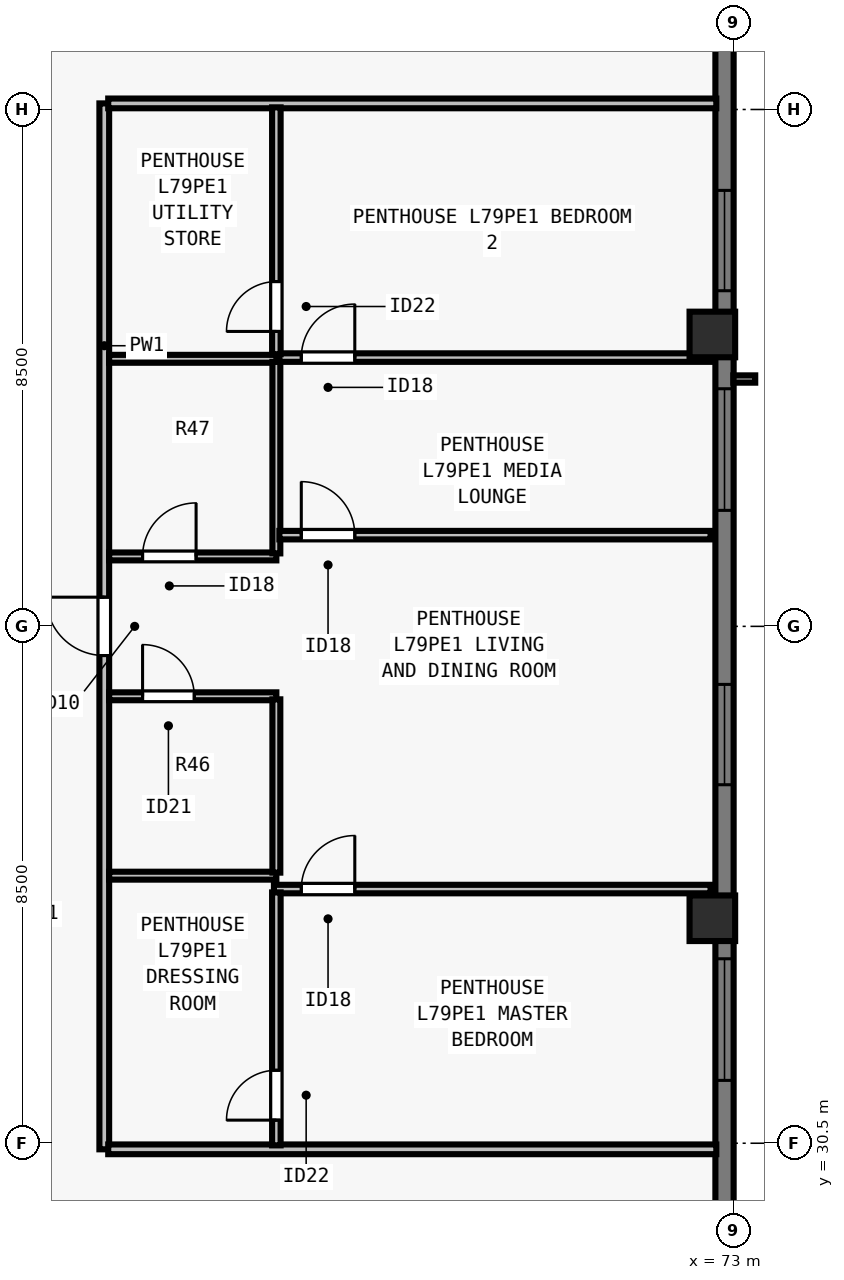
"""IFC4 building model, lengths in metres.
Left out: names, types, materials, properties, quantities, classifications, styles, units other than length and angle.
Written with IfcOpenShell. Run it as: python <this file> out.ifc"""

import sys

from ifc_helpers import new_model, si_unit, direction, frame, frame_2d, origin, origin_2d, place, context, subcontext, project, spatial, rectangle, extrude, element, fill, save


model = new_model("IFC4")
c1 = context("Model", 3, precision=1e-05, world=origin(), true_north=direction((0.0, 1.0)))
c2 = subcontext(c1, "Body", "Model", "MODEL_VIEW")
j1 = project(units=[si_unit("LENGTHUNIT", "METRE"), si_unit("PLANEANGLEUNIT", "RADIAN")], contexts=[c1])
p1 = place(None, origin())
s1 = spatial("IfcSite", under=j1, at=p1, CompositionType="ELEMENT")
p2 = place(p1, origin())
s2 = spatial("IfcBuilding", under=s1, at=p2, CompositionType="ELEMENT")
p3 = place(p2, frame((0.0, 0.0, 287.5)))
s3 = spatial("IfcBuildingStorey", under=s2, at=p3, CompositionType="ELEMENT", Elevation=287.5)
for number, where, z_axis, x_axis in (
    (1, (72.65, 34.2, 0.0), (0.0, 0.0, 1.0), (0.0, 1.0, 0.0)),
    (2, (72.65, 43.8, 0.0), (0.0, 0.0, 1.0), (0.0, 1.0, 0.0)),
):
    element("IfcColumn", number, at=place(p3, frame(where, z_axis=z_axis, x_axis=x_axis)), inside=s3, PredefinedType="COLUMN", context=c2, shape_type="SweptSolid", body=[
        extrude(rectangle(XDim=0.75, YDim=0.75, at=origin_2d()), origin(), (0.0, 0.0, 1.0), 3.5),
    ])
p4 = place(p3, frame((72.85, 54.5, 0.0), z_axis=(0.0, 0.0, 1.0), x_axis=(0.0, -1.0, 0.0)))
e3 = element("IfcWall", 3, at=p4, inside=s3, PredefinedType="SOLIDWALL", context=c2, shape_type="SweptSolid", body=[
    extrude(rectangle(XDim=30.722, YDim=0.3, at=frame_2d((15.361, 0.0))), origin(), (0.0, 0.0, 1.0), 3.29),
])
p5 = place(p4, frame((8.331, 0.0, 0.8)))
e4 = element("IfcOpeningElement", 4, at=p5, cuts=e3, PredefinedType="OPENING", context=c2, shape_type="SweptSolid", body=[
    extrude(rectangle(XDim=1.65, YDim=1.758, at=frame_2d((0.825, 0.879))), frame((0.0, 0.16, 0.0), z_axis=(0.0, -1.0, 0.0), x_axis=(1.0, 0.0, 0.0)), (0.0, 0.0, 1.0), 0.32),
])
p6 = place(p4, frame((11.593, 0.0, 0.8)))
e5 = element("IfcOpeningElement", 5, at=p6, cuts=e3, PredefinedType="OPENING", context=c2, shape_type="SweptSolid", body=[
    extrude(rectangle(XDim=2.0, YDim=1.758, at=frame_2d((1.0, 0.879))), frame((0.0, 0.16, 0.0), z_axis=(0.0, -1.0, 0.0), x_axis=(1.0, 0.0, 0.0)), (0.0, 0.0, 1.0), 0.32),
])
p7 = place(p4, frame((16.455, 0.0, 0.8)))
e6 = element("IfcOpeningElement", 6, at=p7, cuts=e3, PredefinedType="OPENING", context=c2, shape_type="SweptSolid", body=[
    extrude(rectangle(XDim=1.65, YDim=1.758, at=frame_2d((0.825, 0.879))), frame((0.0, 0.16, 0.0), z_axis=(0.0, -1.0, 0.0), x_axis=(1.0, 0.0, 0.0)), (0.0, 0.0, 1.0), 0.32),
])
p8 = place(p4, frame((20.967, 0.0, 0.8)))
e7 = element("IfcOpeningElement", 7, at=p8, cuts=e3, PredefinedType="OPENING", context=c2, shape_type="SweptSolid", body=[
    extrude(rectangle(XDim=2.0, YDim=1.758, at=frame_2d((1.0, 0.879))), frame((0.0, 0.16, 0.0), z_axis=(0.0, -1.0, 0.0), x_axis=(1.0, 0.0, 0.0)), (0.0, 0.0, 1.0), 0.32),
])
p9 = place(p3, frame((62.65, 30.4, 0.0), z_axis=(0.0, 0.0, 1.0), x_axis=(0.0, 1.0, 0.0)))
e8 = element("IfcWall", 8, at=p9, inside=s3, PredefinedType="PARTITIONING", context=c2, shape_type="SweptSolid", body=[
    extrude(rectangle(XDim=17.2, YDim=0.16, at=frame_2d((8.6, 0.0))), origin(), (0.0, 0.0, 1.0), 3.29),
])
p10 = place(p9, frame((8.12, 0.0, 0.0)))
e9 = element("IfcOpeningElement", 9, at=p10, cuts=e8, PredefinedType="OPENING", context=c2, shape_type="SweptSolid", body=[
    extrude(rectangle(XDim=0.96, YDim=2.18, at=frame_2d((0.48, 1.09))), frame((0.0, 0.09, 0.0), z_axis=(0.0, -1.0, 0.0), x_axis=(1.0, 0.0, 0.0)), (0.0, 0.0, 1.0), 0.18),
])
for number, where, z_axis, x_axis in (
    (10, (62.715, 30.4, 0.0), (0.0, 0.0, 1.0), (1.0, 0.0, 0.0)),
    (11, (62.715, 47.6, 0.0), (0.0, 0.0, 1.0), (1.0, 0.0, 0.0)),
):
    element("IfcWall", number, at=place(p3, frame(where, z_axis=z_axis, x_axis=x_axis)), inside=s3, PredefinedType="PARTITIONING", context=c2, shape_type="SweptSolid", body=[
        extrude(rectangle(XDim=10.0, YDim=0.16, at=frame_2d((5.0, 0.0))), origin(), (0.0, 0.0, 1.0), 3.29),
    ])
p11 = place(p3, frame((62.73, 34.9, 0.0), z_axis=(0.0, 0.0, 1.0), x_axis=(1.0, 0.0, 0.0)))
e12 = element("IfcWall", 12, at=p11, inside=s3, PredefinedType="PLUMBINGWALL", context=c2, shape_type="SweptSolid", body=[
    extrude(rectangle(XDim=2.75, YDim=0.13, at=frame_2d((1.375, 0.0))), origin(), (0.0, 0.0, 1.0), 3.29),
])
p12 = place(p3, frame((62.73, 37.85, 0.0), z_axis=(0.0, 0.0, 1.0), x_axis=(1.0, 0.0, 0.0)))
e13 = element("IfcWall", 13, at=p12, inside=s3, PredefinedType="PLUMBINGWALL", context=c2, shape_type="SweptSolid", body=[
    extrude(rectangle(XDim=2.75, YDim=0.13, at=frame_2d((1.375, 0.0))), origin(), (0.0, 0.0, 1.0), 3.29),
])
p13 = place(p12, frame((0.55, 0.0, 0.0)))
e14 = element("IfcOpeningElement", 14, at=p13, cuts=e13, PredefinedType="OPENING", context=c2, shape_type="SweptSolid", body=[
    extrude(rectangle(XDim=0.85, YDim=2.08, at=frame_2d((0.425, 1.04))), frame((0.0, 0.075, 0.0), z_axis=(0.0, -1.0, 0.0), x_axis=(1.0, 0.0, 0.0)), (0.0, 0.0, 1.0), 0.15),
])
p14 = place(p3, frame((65.48, 34.95, 0.0), z_axis=(0.0, 0.0, 1.0), x_axis=(0.0, 1.0, 0.0)))
e15 = element("IfcWall", 15, at=p14, inside=s3, PredefinedType="PLUMBINGWALL", context=c2, shape_type="SweptSolid", body=[
    extrude(rectangle(XDim=2.85, YDim=0.13, at=frame_2d((1.425, 0.0))), origin(), (0.0, 0.0, 1.0), 3.29),
])
p15 = place(p3, frame((62.73, 43.4, 0.0), z_axis=(0.0, 0.0, 1.0), x_axis=(1.0, 0.0, 0.0)))
e16 = element("IfcWall", 16, at=p15, inside=s3, PredefinedType="PLUMBINGWALL", context=c2, shape_type="SweptSolid", body=[
    extrude(rectangle(XDim=2.75, YDim=0.13, at=frame_2d((1.375, 0.0))), origin(), (0.0, 0.0, 1.0), 3.29),
])
p16 = place(p3, frame((62.73, 40.15, 0.0), z_axis=(0.0, 0.0, 1.0), x_axis=(1.0, 0.0, 0.0)))
e17 = element("IfcWall", 17, at=p16, inside=s3, PredefinedType="PLUMBINGWALL", context=c2, shape_type="SweptSolid", body=[
    extrude(rectangle(XDim=2.75, YDim=0.13, at=frame_2d((1.375, 0.0))), origin(), (0.0, 0.0, 1.0), 3.29),
])
p17 = place(p16, frame((0.55, 0.0, 0.0)))
e18 = element("IfcOpeningElement", 18, at=p17, cuts=e17, PredefinedType="OPENING", context=c2, shape_type="SweptSolid", body=[
    extrude(rectangle(XDim=0.88, YDim=2.1, at=frame_2d((0.44, 1.05))), frame((0.0, 0.075, 0.0), z_axis=(0.0, -1.0, 0.0), x_axis=(1.0, 0.0, 0.0)), (0.0, 0.0, 1.0), 0.15),
])
p18 = place(p3, frame((65.48, 40.2, 0.0), z_axis=(0.0, 0.0, 1.0), x_axis=(0.0, 1.0, 0.0)))
e19 = element("IfcWall", 19, at=p18, inside=s3, PredefinedType="PLUMBINGWALL", context=c2, shape_type="SweptSolid", body=[
    extrude(rectangle(XDim=3.15, YDim=0.13, at=frame_2d((1.575, 0.0))), origin(), (0.0, 0.0, 1.0), 3.29),
])
p19 = place(p3, frame((65.44, 34.68, 0.0), z_axis=(0.0, 0.0, 1.0), x_axis=(1.0, 0.0, 0.0)))
e20 = element("IfcWall", 20, at=p19, inside=s3, PredefinedType="PARTITIONING", context=c2, shape_type="SweptSolid", body=[
    extrude(rectangle(XDim=7.18, YDim=0.14, at=frame_2d((3.59, 0.0))), origin(), (0.0, 0.0, 1.0), 3.29),
])
p20 = place(p19, frame((0.45, 0.0, 0.0)))
e21 = element("IfcOpeningElement", 21, at=p20, cuts=e20, PredefinedType="OPENING", context=c2, shape_type="SweptSolid", body=[
    extrude(rectangle(XDim=0.88, YDim=2.1, at=frame_2d((0.44, 1.05))), frame((0.0, 0.08, 0.0), z_axis=(0.0, -1.0, 0.0), x_axis=(1.0, 0.0, 0.0)), (0.0, 0.0, 1.0), 0.16),
])
p21 = place(p3, frame((65.48, 30.465, 0.0), z_axis=(0.0, 0.0, 1.0), x_axis=(0.0, 1.0, 0.0)))
e22 = element("IfcWall", 22, at=p21, inside=s3, PredefinedType="PARTITIONING", context=c2, shape_type="SweptSolid", body=[
    extrude(rectangle(XDim=4.16, YDim=0.14, at=frame_2d((2.08, 0.0))), origin(), (0.0, 0.0, 1.0), 3.29),
])
p22 = place(p21, frame((0.415, 0.0, 0.0)))
e23 = element("IfcOpeningElement", 23, at=p22, cuts=e22, PredefinedType="OPENING", context=c2, shape_type="SweptSolid", body=[
    extrude(rectangle(XDim=0.82, YDim=2.1, at=frame_2d((0.41, 1.05))), frame((0.0, 0.08, 0.0), z_axis=(0.0, -1.0, 0.0), x_axis=(1.0, 0.0, 0.0)), (0.0, 0.0, 1.0), 0.16),
])
p23 = place(p3, frame((65.53, 43.42, 0.0), z_axis=(0.0, 0.0, 1.0), x_axis=(1.0, 0.0, 0.0)))
e24 = element("IfcWall", 24, at=p23, inside=s3, PredefinedType="PARTITIONING", context=c2, shape_type="SweptSolid", body=[
    extrude(rectangle(XDim=7.09, YDim=0.14, at=frame_2d((3.545, 0.0))), origin(), (0.0, 0.0, 1.0), 3.29),
])
p24 = place(p23, frame((0.36, 0.0, 0.0)))
e25 = element("IfcOpeningElement", 25, at=p24, cuts=e24, PredefinedType="OPENING", context=c2, shape_type="SweptSolid", body=[
    extrude(rectangle(XDim=0.88, YDim=2.1, at=frame_2d((0.44, 1.05))), frame((0.0, 0.08, 0.0), z_axis=(0.0, -1.0, 0.0), x_axis=(1.0, 0.0, 0.0)), (0.0, 0.0, 1.0), 0.16),
])
p25 = place(p3, frame((65.48, 43.475, 0.0), z_axis=(0.0, 0.0, 1.0), x_axis=(0.0, 1.0, 0.0)))
e26 = element("IfcWall", 26, at=p25, inside=s3, PredefinedType="PARTITIONING", context=c2, shape_type="SweptSolid", body=[
    extrude(rectangle(XDim=4.06, YDim=0.14, at=frame_2d((2.03, 0.0))), origin(), (0.0, 0.0, 1.0), 3.29),
])
p26 = place(p25, frame((0.375, 0.0, 0.0)))
e27 = element("IfcOpeningElement", 27, at=p26, cuts=e26, PredefinedType="OPENING", context=c2, shape_type="SweptSolid", body=[
    extrude(rectangle(XDim=0.82, YDim=2.1, at=frame_2d((0.41, 1.05))), frame((0.0, 0.08, 0.0), z_axis=(0.0, -1.0, 0.0), x_axis=(1.0, 0.0, 0.0)), (0.0, 0.0, 1.0), 0.16),
])
p27 = place(p3, frame((65.53, 40.5, 0.0), z_axis=(0.0, 0.0, 1.0), x_axis=(1.0, 0.0, 0.0)))
e28 = element("IfcWall", 28, at=p27, inside=s3, PredefinedType="PARTITIONING", context=c2, shape_type="SweptSolid", body=[
    extrude(rectangle(XDim=7.09, YDim=0.14, at=frame_2d((3.545, 0.0))), origin(), (0.0, 0.0, 1.0), 3.29),
])
p28 = place(p27, frame((0.36, 0.0, 0.0)))
e29 = element("IfcOpeningElement", 29, at=p28, cuts=e28, PredefinedType="OPENING", context=c2, shape_type="SweptSolid", body=[
    extrude(rectangle(XDim=0.88, YDim=2.1, at=frame_2d((0.44, 1.05))), frame((0.0, 0.08, 0.0), z_axis=(0.0, -1.0, 0.0), x_axis=(1.0, 0.0, 0.0)), (0.0, 0.0, 1.0), 0.16),
])
p29 = place(p5, origin())
e30 = element("IfcWindow", 30, at=p29, inside=s3, PartitioningType="SINGLE_PANEL", PredefinedType="WINDOW", context=c2, shape_type="SweptSolid", body=[
    extrude(rectangle(XDim=1.65, YDim=1.758, at=frame_2d((0.825, 0.879))), frame((0.0, -0.05, 0.0), z_axis=(0.0, -1.0, 0.0), x_axis=(1.0, 0.0, 0.0)), (0.0, 0.0, 1.0), 0.06),
])
fill(e4, e30)
p30 = place(p6, origin())
e31 = element("IfcWindow", 31, at=p30, inside=s3, PartitioningType="SINGLE_PANEL", PredefinedType="WINDOW", context=c2, shape_type="SweptSolid", body=[
    extrude(rectangle(XDim=2.0, YDim=1.758, at=frame_2d((1.0, 0.879))), frame((0.0, -0.05, 0.0), z_axis=(0.0, -1.0, 0.0), x_axis=(1.0, 0.0, 0.0)), (0.0, 0.0, 1.0), 0.06),
])
fill(e5, e31)
p31 = place(p7, origin())
e32 = element("IfcWindow", 32, at=p31, inside=s3, PartitioningType="SINGLE_PANEL", PredefinedType="WINDOW", context=c2, shape_type="SweptSolid", body=[
    extrude(rectangle(XDim=1.65, YDim=1.758, at=frame_2d((0.825, 0.879))), frame((0.0, -0.05, 0.0), z_axis=(0.0, -1.0, 0.0), x_axis=(1.0, 0.0, 0.0)), (0.0, 0.0, 1.0), 0.06),
])
fill(e6, e32)
p32 = place(p8, origin())
e33 = element("IfcWindow", 33, at=p32, inside=s3, PartitioningType="SINGLE_PANEL", PredefinedType="WINDOW", context=c2, shape_type="SweptSolid", body=[
    extrude(rectangle(XDim=2.0, YDim=1.758, at=frame_2d((1.0, 0.879))), frame((0.0, -0.05, 0.0), z_axis=(0.0, -1.0, 0.0), x_axis=(1.0, 0.0, 0.0)), (0.0, 0.0, 1.0), 0.06),
])
fill(e7, e33)
p33 = place(p13, origin())
e34 = element("IfcDoor", 34, at=p33, inside=s3, OperationType="SINGLE_SWING_LEFT", PredefinedType="DOOR", context=c2, shape_type="SweptSolid", body=[
    extrude(rectangle(XDim=0.85, YDim=2.08, at=frame_2d((0.425, 1.04))), frame((0.0, 0.025, 0.0), z_axis=(0.0, -1.0, 0.0), x_axis=(1.0, 0.0, 0.0)), (0.0, 0.0, 1.0), 0.05),
])
fill(e14, e34)
p34 = place(p17, origin())
e35 = element("IfcDoor", 35, at=p34, inside=s3, OperationType="SINGLE_SWING_RIGHT", PredefinedType="DOOR", context=c2, shape_type="SweptSolid", body=[
    extrude(rectangle(XDim=0.88, YDim=2.1, at=frame_2d((0.44, 1.05))), frame((0.0, 0.025, 0.0), z_axis=(0.0, -1.0, 0.0), x_axis=(1.0, 0.0, 0.0)), (0.0, 0.0, 1.0), 0.05),
])
fill(e18, e35)
p35 = place(p22, origin())
e36 = element("IfcDoor", 36, at=p35, inside=s3, OperationType="SINGLE_SWING_LEFT", PredefinedType="DOOR", context=c2, shape_type="SweptSolid", body=[
    extrude(rectangle(XDim=0.82, YDim=2.1, at=frame_2d((0.41, 1.05))), frame((0.0, 0.025, 0.0), z_axis=(0.0, -1.0, 0.0), x_axis=(1.0, 0.0, 0.0)), (0.0, 0.0, 1.0), 0.05),
])
fill(e23, e36)
p36 = place(p20, origin())
e37 = element("IfcDoor", 37, at=p36, inside=s3, OperationType="SINGLE_SWING_RIGHT", PredefinedType="DOOR", context=c2, shape_type="SweptSolid", body=[
    extrude(rectangle(XDim=0.88, YDim=2.1, at=frame_2d((0.44, 1.05))), frame((0.0, 0.025, 0.0), z_axis=(0.0, -1.0, 0.0), x_axis=(1.0, 0.0, 0.0)), (0.0, 0.0, 1.0), 0.05),
])
fill(e21, e37)
p37 = place(p26, origin())
e38 = element("IfcDoor", 38, at=p37, inside=s3, OperationType="SINGLE_SWING_LEFT", PredefinedType="DOOR", context=c2, shape_type="SweptSolid", body=[
    extrude(rectangle(XDim=0.82, YDim=2.1, at=frame_2d((0.41, 1.05))), frame((0.0, 0.025, 0.0), z_axis=(0.0, -1.0, 0.0), x_axis=(1.0, 0.0, 0.0)), (0.0, 0.0, 1.0), 0.05),
])
fill(e27, e38)
p38 = place(p24, origin())
e39 = element("IfcDoor", 39, at=p38, inside=s3, OperationType="SINGLE_SWING_RIGHT", PredefinedType="DOOR", context=c2, shape_type="SweptSolid", body=[
    extrude(rectangle(XDim=0.88, YDim=2.1, at=frame_2d((0.44, 1.05))), frame((0.0, 0.025, 0.0), z_axis=(0.0, -1.0, 0.0), x_axis=(1.0, 0.0, 0.0)), (0.0, 0.0, 1.0), 0.05),
])
fill(e25, e39)
p39 = place(p28, origin())
e40 = element("IfcDoor", 40, at=p39, inside=s3, OperationType="SINGLE_SWING_LEFT", PredefinedType="DOOR", context=c2, shape_type="SweptSolid", body=[
    extrude(rectangle(XDim=0.88, YDim=2.1, at=frame_2d((0.44, 1.05))), frame((0.0, 0.025, 0.0), z_axis=(0.0, -1.0, 0.0), x_axis=(1.0, 0.0, 0.0)), (0.0, 0.0, 1.0), 0.05),
])
fill(e29, e40)
p40 = place(p10, origin())
e41 = element("IfcDoor", 41, at=p40, inside=s3, OperationType="SINGLE_SWING_RIGHT", PredefinedType="DOOR", context=c2, shape_type="SweptSolid", body=[
    extrude(rectangle(XDim=0.96, YDim=2.18, at=frame_2d((0.48, 1.09))), frame((0.0, 0.025, 0.0), z_axis=(0.0, -1.0, 0.0), x_axis=(1.0, 0.0, 0.0)), (0.0, 0.0, 1.0), 0.05),
])
fill(e9, e41)
save(model, sys.argv[1])
